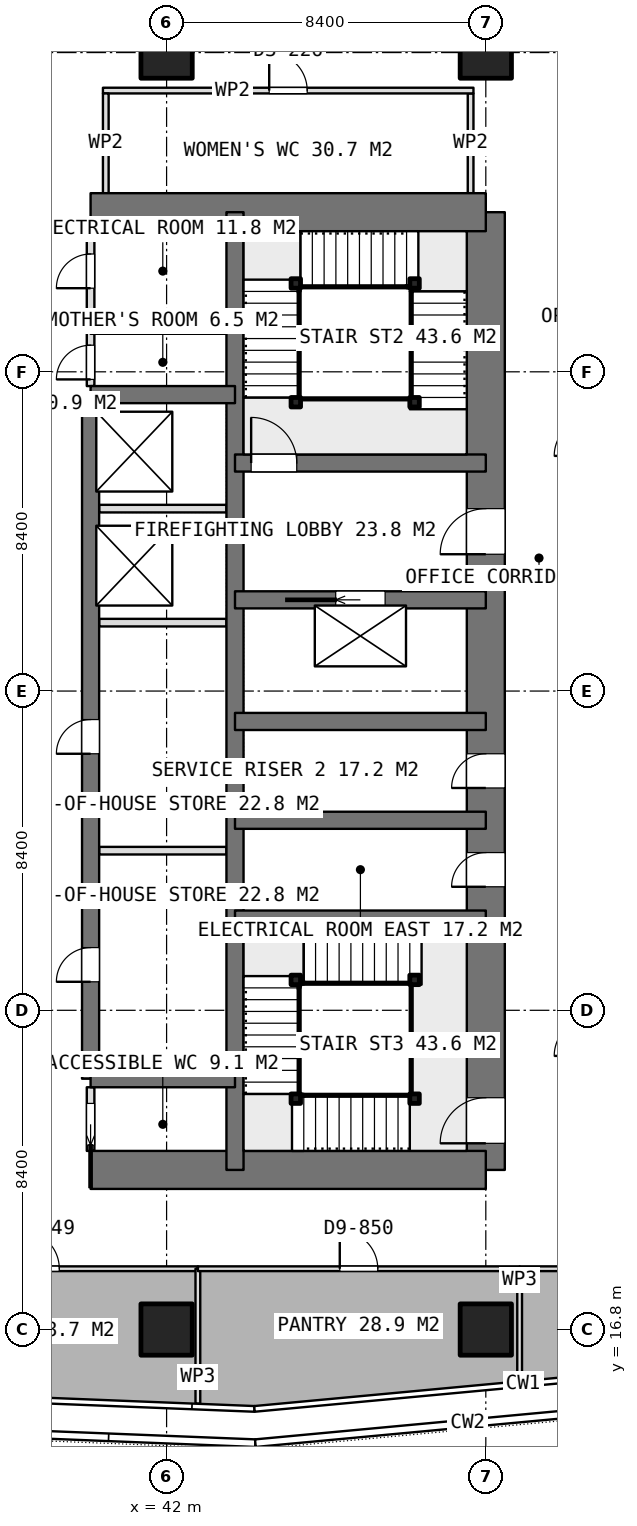
"""IFC4 building model, lengths in metres.
Left out: names, types, materials, properties, quantities, classifications, styles, units other than length and angle.
Written with IfcOpenShell. Run it as: python <this file> out.ifc"""

import sys

from ifc_helpers import new_model, si_unit, direction, frame, frame_2d, origin, origin_2d, place, context, subcontext, project, spatial, rectangle, extrude, element, fill, save


model = new_model("IFC4")
c1 = context("Model", 3, precision=1e-05, world=origin(), true_north=direction((0.0, 1.0)))
c2 = subcontext(c1, "Body", "Model", "MODEL_VIEW")
j1 = project(units=[si_unit("LENGTHUNIT", "METRE"), si_unit("PLANEANGLEUNIT", "RADIAN")], contexts=[c1])
p1 = place(None, origin())
s1 = spatial("IfcSite", under=j1, at=p1, CompositionType="ELEMENT")
p2 = place(p1, origin())
s2 = spatial("IfcBuilding", under=s1, at=p2, CompositionType="ELEMENT")
p3 = place(p2, frame((0.0, 0.0, 210.2)))
s3 = spatial("IfcBuildingStorey", under=s2, at=p3, CompositionType="ELEMENT", Elevation=210.2)
for number, where, z_axis, x_axis in (
    (1, (40.0, 21.0, 0.0), (0.0, 0.0, 1.0), (1.0, 0.0, 0.0)),
    (2, (40.0, 46.2, 0.0), (0.0, 0.0, 1.0), (1.0, 0.0, 0.0)),
):
    element("IfcWall", number, at=place(p3, frame(where, z_axis=z_axis, x_axis=x_axis)), inside=s3, PredefinedType="SHEAR", context=c2, shape_type="SweptSolid", body=[
        extrude(rectangle(XDim=10.4, YDim=1.0, at=frame_2d((5.2, 0.0))), origin(), (0.0, 0.0, 1.0), 3.75),
    ])
p4 = place(p3, frame((50.4, 21.0, 0.0), z_axis=(0.0, 0.0, 1.0), x_axis=(0.0, 1.0, 0.0)))
e3 = element("IfcWall", 3, at=p4, inside=s3, PredefinedType="SHEAR", context=c2, shape_type="SweptSolid", body=[
    extrude(rectangle(XDim=25.2, YDim=1.0, at=frame_2d((12.6, 0.0))), origin(), (0.0, 0.0, 1.0), 3.75),
])
p5 = place(p4, frame((16.2, 0.0, 0.0)))
e4 = element("IfcOpeningElement", 4, at=p5, cuts=e3, PredefinedType="OPENING", context=c2, shape_type="SweptSolid", body=[
    extrude(rectangle(XDim=1.2, YDim=2.1, at=frame_2d((0.6, 1.05))), frame((0.0, 0.51, 0.0), z_axis=(0.0, -1.0, 0.0), x_axis=(1.0, 0.0, 0.0)), (0.0, 0.0, 1.0), 1.02),
])
p6 = place(p4, frame((10.05, 0.0, 0.0)))
e5 = element("IfcOpeningElement", 5, at=p6, cuts=e3, PredefinedType="OPENING", context=c2, shape_type="SweptSolid", body=[
    extrude(rectangle(XDim=0.9, YDim=2.1, at=frame_2d((0.45, 1.05))), frame((0.0, 0.51, 0.0), z_axis=(0.0, -1.0, 0.0), x_axis=(1.0, 0.0, 0.0)), (0.0, 0.0, 1.0), 1.02),
])
p7 = place(p4, frame((7.45, 0.0, 0.0)))
e6 = element("IfcOpeningElement", 6, at=p7, cuts=e3, PredefinedType="OPENING", context=c2, shape_type="SweptSolid", body=[
    extrude(rectangle(XDim=0.9, YDim=2.1, at=frame_2d((0.45, 1.05))), frame((0.0, 0.51, 0.0), z_axis=(0.0, -1.0, 0.0), x_axis=(1.0, 0.0, 0.0)), (0.0, 0.0, 1.0), 1.02),
])
p8 = place(p4, frame((0.7, 0.0, 0.0)))
e7 = element("IfcOpeningElement", 7, at=p8, cuts=e3, PredefinedType="OPENING", context=c2, shape_type="SweptSolid", body=[
    extrude(rectangle(XDim=1.2, YDim=2.1, at=frame_2d((0.6, 1.05))), frame((0.0, 0.51, 0.0), z_axis=(0.0, -1.0, 0.0), x_axis=(1.0, 0.0, 0.0)), (0.0, 0.0, 1.0), 1.02),
])
p9 = place(p3, frame((43.8, 21.0, 0.0), z_axis=(0.0, 0.0, 1.0), x_axis=(0.0, 1.0, 0.0)))
e8 = element("IfcWall", 8, at=p9, inside=s3, PredefinedType="SHEAR", context=c2, shape_type="SweptSolid", body=[
    extrude(rectangle(XDim=25.2, YDim=0.45, at=frame_2d((12.6, 0.0))), origin(), (0.0, 0.0, 1.0), 3.75),
])
p10 = place(p3, frame((40.0, 23.4, 0.0), z_axis=(0.0, 0.0, 1.0), x_axis=(0.0, 1.0, 0.0)))
e9 = element("IfcWall", 9, at=p10, inside=s3, PredefinedType="SHEAR", context=c2, shape_type="SweptSolid", body=[
    extrude(rectangle(XDim=18.0, YDim=0.45, at=frame_2d((9.0, 0.0))), origin(), (0.0, 0.0, 1.0), 3.75),
])
p11 = place(p10, frame((2.55, 0.0, 0.0)))
e10 = element("IfcOpeningElement", 10, at=p11, cuts=e9, PredefinedType="OPENING", context=c2, shape_type="SweptSolid", body=[
    extrude(rectangle(XDim=0.9, YDim=2.1, at=frame_2d((0.45, 1.05))), frame((0.0, 0.235, 0.0), z_axis=(0.0, -1.0, 0.0), x_axis=(1.0, 0.0, 0.0)), (0.0, 0.0, 1.0), 0.47),
])
p12 = place(p10, frame((8.55, 0.0, 0.0)))
e11 = element("IfcOpeningElement", 11, at=p12, cuts=e9, PredefinedType="OPENING", context=c2, shape_type="SweptSolid", body=[
    extrude(rectangle(XDim=0.9, YDim=2.1, at=frame_2d((0.45, 1.05))), frame((0.0, 0.235, 0.0), z_axis=(0.0, -1.0, 0.0), x_axis=(1.0, 0.0, 0.0)), (0.0, 0.0, 1.0), 0.47),
])
for number, where, z_axis, x_axis in (
    (12, (40.0, 23.4, 0.0), (0.0, 0.0, 1.0), (1.0, 0.0, 0.0)),
    (13, (40.0, 41.4, 0.0), (0.0, 0.0, 1.0), (1.0, 0.0, 0.0)),
):
    element("IfcWall", number, at=place(p3, frame(where, z_axis=z_axis, x_axis=x_axis)), inside=s3, PredefinedType="SHEAR", context=c2, shape_type="SweptSolid", body=[
        extrude(rectangle(XDim=3.8, YDim=0.45, at=frame_2d((1.9, 0.0))), origin(), (0.0, 0.0, 1.0), 3.75),
    ])
for number, where, z_axis, x_axis in (
    (14, (43.8, 27.6, 0.0), (0.0, 0.0, 1.0), (1.0, 0.0, 0.0)),
    (15, (43.8, 30.2, 0.0), (0.0, 0.0, 1.0), (1.0, 0.0, 0.0)),
    (16, (43.8, 32.8, 0.0), (0.0, 0.0, 1.0), (1.0, 0.0, 0.0)),
):
    element("IfcWall", number, at=place(p3, frame(where, z_axis=z_axis, x_axis=x_axis)), inside=s3, PredefinedType="SHEAR", context=c2, shape_type="SweptSolid", body=[
        extrude(rectangle(XDim=6.6, YDim=0.45, at=frame_2d((3.3, 0.0))), origin(), (0.0, 0.0, 1.0), 3.75),
    ])
p13 = place(p3, frame((43.8, 36.0, 0.0), z_axis=(0.0, 0.0, 1.0), x_axis=(1.0, 0.0, 0.0)))
e17 = element("IfcWall", 17, at=p13, inside=s3, PredefinedType="SHEAR", context=c2, shape_type="SweptSolid", body=[
    extrude(rectangle(XDim=6.6, YDim=0.45, at=frame_2d((3.3, 0.0))), origin(), (0.0, 0.0, 1.0), 3.75),
])
p14 = place(p13, frame((2.65, 0.0, 0.0)))
e18 = element("IfcOpeningElement", 18, at=p14, cuts=e17, PredefinedType="OPENING", context=c2, shape_type="SweptSolid", body=[
    extrude(rectangle(XDim=1.3, YDim=2.1, at=frame_2d((0.65, 1.05))), frame((0.0, 0.235, 0.0), z_axis=(0.0, -1.0, 0.0), x_axis=(1.0, 0.0, 0.0)), (0.0, 0.0, 1.0), 0.47),
])
p15 = place(p3, frame((43.8, 39.6, 0.0), z_axis=(0.0, 0.0, 1.0), x_axis=(1.0, 0.0, 0.0)))
e19 = element("IfcWall", 19, at=p15, inside=s3, PredefinedType="SHEAR", context=c2, shape_type="SweptSolid", body=[
    extrude(rectangle(XDim=6.6, YDim=0.45, at=frame_2d((3.3, 0.0))), origin(), (0.0, 0.0, 1.0), 3.75),
])
p16 = place(p15, frame((0.425, 0.0, 0.0)))
e20 = element("IfcOpeningElement", 20, at=p16, cuts=e19, PredefinedType="OPENING", context=c2, shape_type="SweptSolid", body=[
    extrude(rectangle(XDim=1.2, YDim=2.1, at=frame_2d((0.6, 1.05))), frame((0.0, 0.235, 0.0), z_axis=(0.0, -1.0, 0.0), x_axis=(1.0, 0.0, 0.0)), (0.0, 0.0, 1.0), 0.47),
])
for number, where, z_axis, x_axis in (
    (21, (42.0, 16.8, 0.0), (0.0, 0.0, 1.0), (1.0, 0.0, 0.0)),
    (22, (42.0, 50.4, 0.0), (0.0, 0.0, 1.0), (1.0, 0.0, 0.0)),
    (23, (50.4, 16.8, 0.0), (0.0, 0.0, 1.0), (1.0, 0.0, 0.0)),
    (24, (50.4, 50.4, 0.0), (0.0, 0.0, 1.0), (1.0, 0.0, 0.0)),
):
    element("IfcColumn", number, at=place(p3, frame(where, z_axis=z_axis, x_axis=x_axis)), inside=s3, PredefinedType="COLUMN", context=c2, shape_type="SweptSolid", body=[
        extrude(rectangle(XDim=1.35, YDim=1.35, at=origin_2d()), origin(), (0.0, 0.0, 1.0), 3.75),
    ])
for number, where, z_axis, x_axis in (
    (25, (40.225, 29.4, 0.0), (0.0, 0.0, 1.0), (1.0, 0.0, 0.0)),
    (26, (40.225, 35.4, 0.0), (0.0, 0.0, 1.0), (1.0, 0.0, 0.0)),
    (27, (40.225, 38.4, 0.0), (0.0, 0.0, 1.0), (1.0, 0.0, 0.0)),
):
    element("IfcWall", number, at=place(p3, frame(where, z_axis=z_axis, x_axis=x_axis)), inside=s3, PredefinedType="PARTITIONING", context=c2, shape_type="SweptSolid", body=[
        extrude(rectangle(XDim=3.35, YDim=0.2, at=frame_2d((1.675, 0.0))), origin(), (0.0, 0.0, 1.0), 3.5),
    ])
p17 = place(p3, frame((40.0, 21.5, 0.0), z_axis=(0.0, 0.0, 1.0), x_axis=(0.0, 1.0, 0.0)))
e28 = element("IfcWall", 28, at=p17, inside=s3, PredefinedType="PARTITIONING", context=c2, shape_type="SweptSolid", body=[
    extrude(rectangle(XDim=1.675, YDim=0.2, at=frame_2d((0.837, 0.0))), origin(), (0.0, 0.0, 1.0), 3.5),
])
p18 = place(p17, frame((0.15, 0.0, 0.0)))
e29 = element("IfcOpeningElement", 29, at=p18, cuts=e28, PredefinedType="OPENING", context=c2, shape_type="SweptSolid", body=[
    extrude(rectangle(XDim=1.1, YDim=2.1, at=frame_2d((0.55, 1.05))), frame((0.0, 0.11, 0.0), z_axis=(0.0, -1.0, 0.0), x_axis=(1.0, 0.0, 0.0)), (0.0, 0.0, 1.0), 0.22),
])
p19 = place(p3, frame((40.0, 41.625, 0.0), z_axis=(0.0, 0.0, 1.0), x_axis=(0.0, 1.0, 0.0)))
e30 = element("IfcWall", 30, at=p19, inside=s3, PredefinedType="PARTITIONING", context=c2, shape_type="SweptSolid", body=[
    extrude(rectangle(XDim=4.075, YDim=0.2, at=frame_2d((2.038, 0.0))), origin(), (0.0, 0.0, 1.0), 3.5),
])
p20 = place(p19, frame((2.575, 0.0, 0.0)))
e31 = element("IfcOpeningElement", 31, at=p20, cuts=e30, PredefinedType="OPENING", context=c2, shape_type="SweptSolid", body=[
    extrude(rectangle(XDim=0.9, YDim=2.1, at=frame_2d((0.45, 1.05))), frame((0.0, 0.11, 0.0), z_axis=(0.0, -1.0, 0.0), x_axis=(1.0, 0.0, 0.0)), (0.0, 0.0, 1.0), 0.22),
])
p21 = place(p19, frame((0.175, 0.0, 0.0)))
e32 = element("IfcOpeningElement", 32, at=p21, cuts=e30, PredefinedType="OPENING", context=c2, shape_type="SweptSolid", body=[
    extrude(rectangle(XDim=0.9, YDim=2.1, at=frame_2d((0.45, 1.05))), frame((0.0, 0.11, 0.0), z_axis=(0.0, -1.0, 0.0), x_axis=(1.0, 0.0, 0.0)), (0.0, 0.0, 1.0), 0.22),
])
p22 = place(p3, frame((40.0, 43.1, 0.0), z_axis=(0.0, 0.0, 1.0), x_axis=(1.0, 0.0, 0.0)))
e33 = element("IfcWall", 33, at=p22, inside=s3, PredefinedType="PARTITIONING", context=c2, shape_type="SweptSolid", body=[
    extrude(rectangle(XDim=3.575, YDim=0.2, at=frame_2d((1.788, 0.0))), origin(), (0.0, 0.0, 1.0), 3.5),
])
p23 = place(p3, frame((40.325, 49.4, 0.0), z_axis=(0.0, 0.0, 1.0), x_axis=(1.0, 0.0, 0.0)))
e34 = element("IfcWall", 34, at=p23, inside=s3, PredefinedType="PARTITIONING", context=c2, shape_type="SweptSolid", body=[
    extrude(rectangle(XDim=9.75, YDim=0.15, at=frame_2d((4.875, 0.0))), origin(), (0.0, 0.0, 1.0), 3.5),
])
p24 = place(p23, frame((4.375, 0.0, 0.0)))
e35 = element("IfcOpeningElement", 35, at=p24, cuts=e34, PredefinedType="OPENING", context=c2, shape_type="SweptSolid", body=[
    extrude(rectangle(XDim=1.0, YDim=2.1, at=frame_2d((0.5, 1.05))), frame((0.0, 0.085, 0.0), z_axis=(0.0, -1.0, 0.0), x_axis=(1.0, 0.0, 0.0)), (0.0, 0.0, 1.0), 0.17),
])
for number, where, z_axis, x_axis in (
    (36, (40.4, 46.7, 0.0), (0.0, 0.0, 1.0), (0.0, 1.0, 0.0)),
    (37, (50.0, 46.7, 0.0), (0.0, 0.0, 1.0), (0.0, 1.0, 0.0)),
):
    element("IfcWall", number, at=place(p3, frame(where, z_axis=z_axis, x_axis=x_axis)), inside=s3, PredefinedType="PARTITIONING", context=c2, shape_type="SweptSolid", body=[
        extrude(rectangle(XDim=2.625, YDim=0.15, at=frame_2d((1.312, 0.0))), origin(), (0.0, 0.0, 1.0), 3.5),
    ])
p25 = place(p3, frame((34.531, 18.4, 0.0), z_axis=(0.0, 0.0, 1.0), x_axis=(1.0, 0.0, 0.0)))
e38 = element("IfcWall", 38, at=p25, inside=s3, PredefinedType="PARTITIONING", context=c2, shape_type="SweptSolid", body=[
    extrude(rectangle(XDim=8.292, YDim=0.125, at=frame_2d((4.146, 0.0))), origin(), (0.0, 0.0, 1.0), 3.5),
])
p26 = place(p25, frame((3.646, 0.0, 0.0)))
e39 = element("IfcOpeningElement", 39, at=p26, cuts=e38, PredefinedType="OPENING", context=c2, shape_type="SweptSolid", body=[
    extrude(rectangle(XDim=1.0, YDim=2.1, at=frame_2d((0.5, 1.05))), frame((0.0, 0.073, 0.0), z_axis=(0.0, -1.0, 0.0), x_axis=(1.0, 0.0, 0.0)), (0.0, 0.0, 1.0), 0.145),
])
p27 = place(p3, frame((42.823, 18.4, 0.0), z_axis=(0.0, 0.0, 1.0), x_axis=(0.0, -1.0, 0.0)))
e40 = element("IfcWall", 40, at=p27, inside=s3, PredefinedType="PARTITIONING", context=c2, shape_type="SweptSolid", body=[
    extrude(rectangle(XDim=3.549, YDim=0.125, at=frame_2d((1.774, 0.0))), origin(), (0.0, 0.0, 1.0), 3.5),
])
p28 = place(p3, frame((42.824, 18.4, 0.0), z_axis=(0.0, 0.0, 1.0), x_axis=(1.0, 0.0, 0.0)))
e41 = element("IfcWall", 41, at=p28, inside=s3, PredefinedType="PARTITIONING", context=c2, shape_type="SweptSolid", body=[
    extrude(rectangle(XDim=8.466, YDim=0.125, at=frame_2d((4.233, 0.0))), origin(), (0.0, 0.0, 1.0), 3.5),
])
p29 = place(p28, frame((3.733, 0.0, 0.0)))
e42 = element("IfcOpeningElement", 42, at=p29, cuts=e41, PredefinedType="OPENING", context=c2, shape_type="SweptSolid", body=[
    extrude(rectangle(XDim=1.0, YDim=2.1, at=frame_2d((0.5, 1.05))), frame((0.0, 0.073, 0.0), z_axis=(0.0, -1.0, 0.0), x_axis=(1.0, 0.0, 0.0)), (0.0, 0.0, 1.0), 0.145),
])
p30 = place(p3, frame((51.29, 18.4, 0.0), z_axis=(0.0, 0.0, 1.0), x_axis=(0.0, -1.0, 0.0)))
e43 = element("IfcWall", 43, at=p30, inside=s3, PredefinedType="PARTITIONING", context=c2, shape_type="SweptSolid", body=[
    extrude(rectangle(XDim=2.958, YDim=0.125, at=frame_2d((1.479, 0.0))), origin(), (0.0, 0.0, 1.0), 3.5),
])
p31 = place(p3, frame((51.291, 18.4, 0.0), z_axis=(0.0, 0.0, 1.0), x_axis=(1.0, 0.0, 0.0)))
e44 = element("IfcWall", 44, at=p31, inside=s3, PredefinedType="PARTITIONING", context=c2, shape_type="SweptSolid", body=[
    extrude(rectangle(XDim=5.109, YDim=0.125, at=frame_2d((2.554, 0.0))), origin(), (0.0, 0.0, 1.0), 3.5),
])
p32 = place(p31, frame((1.655, 0.0, 0.0)))
e45 = element("IfcOpeningElement", 45, at=p32, cuts=e44, PredefinedType="OPENING", context=c2, shape_type="SweptSolid", body=[
    extrude(rectangle(XDim=1.8, YDim=2.1, at=frame_2d((0.9, 1.05))), frame((0.0, 0.073, 0.0), z_axis=(0.0, -1.0, 0.0), x_axis=(1.0, 0.0, 0.0)), (0.0, 0.0, 1.0), 0.145),
])
for number, where, z_axis, x_axis in (
    (46, (45.4, 41.2, 0.0), (0.0, 0.0, 1.0), (1.0, 0.0, 0.0)),
    (47, (45.4, 44.325, 0.0), (0.0, 0.0, 1.0), (1.0, 0.0, 0.0)),
    (48, (48.525, 44.325, 0.0), (0.0, 0.0, 1.0), (1.0, 0.0, 0.0)),
    (49, (48.525, 41.2, 0.0), (0.0, 0.0, 1.0), (1.0, 0.0, 0.0)),
    (50, (48.525, 22.875, 0.0), (0.0, 0.0, 1.0), (1.0, 0.0, 0.0)),
    (51, (45.4, 22.875, 0.0), (0.0, 0.0, 1.0), (1.0, 0.0, 0.0)),
    (52, (45.4, 26.0, 0.0), (0.0, 0.0, 1.0), (1.0, 0.0, 0.0)),
    (53, (48.525, 26.0, 0.0), (0.0, 0.0, 1.0), (1.0, 0.0, 0.0)),
):
    element("IfcColumn", number, at=place(p3, frame(where, z_axis=z_axis, x_axis=x_axis)), inside=s3, PredefinedType="COLUMN", context=c2, shape_type="SweptSolid", body=[
        extrude(rectangle(XDim=0.25, YDim=0.25, at=origin_2d()), origin(), (0.0, 0.0, 1.0), 3.75),
    ])
p33 = place(p5, origin())
e54 = element("IfcDoor", 54, at=p33, inside=s3, OperationType="SINGLE_SWING_LEFT", PredefinedType="DOOR", context=c2, shape_type="SweptSolid", body=[
    extrude(rectangle(XDim=1.2, YDim=2.1, at=frame_2d((0.6, 1.05))), frame((0.0, 0.025, 0.0), z_axis=(0.0, -1.0, 0.0), x_axis=(1.0, 0.0, 0.0)), (0.0, 0.0, 1.0), 0.05),
])
fill(e4, e54)
p34 = place(p6, origin())
e55 = element("IfcDoor", 55, at=p34, inside=s3, OperationType="SINGLE_SWING_LEFT", PredefinedType="DOOR", context=c2, shape_type="SweptSolid", body=[
    extrude(rectangle(XDim=0.9, YDim=2.1, at=frame_2d((0.45, 1.05))), frame((0.0, 0.025, 0.0), z_axis=(0.0, -1.0, 0.0), x_axis=(1.0, 0.0, 0.0)), (0.0, 0.0, 1.0), 0.05),
])
fill(e5, e55)
p35 = place(p7, origin())
e56 = element("IfcDoor", 56, at=p35, inside=s3, OperationType="SINGLE_SWING_LEFT", PredefinedType="DOOR", context=c2, shape_type="SweptSolid", body=[
    extrude(rectangle(XDim=0.9, YDim=2.1, at=frame_2d((0.45, 1.05))), frame((0.0, 0.025, 0.0), z_axis=(0.0, -1.0, 0.0), x_axis=(1.0, 0.0, 0.0)), (0.0, 0.0, 1.0), 0.05),
])
fill(e6, e56)
p36 = place(p18, origin())
e57 = element("IfcDoor", 57, at=p36, inside=s3, OperationType="SLIDING_TO_LEFT", PredefinedType="DOOR", context=c2, shape_type="SweptSolid", body=[
    extrude(rectangle(XDim=1.1, YDim=2.1, at=frame_2d((0.55, 1.05))), frame((0.0, 0.025, 0.0), z_axis=(0.0, -1.0, 0.0), x_axis=(1.0, 0.0, 0.0)), (0.0, 0.0, 1.0), 0.05),
])
fill(e29, e57)
p37 = place(p20, origin())
e58 = element("IfcDoor", 58, at=p37, inside=s3, OperationType="SINGLE_SWING_LEFT", PredefinedType="DOOR", context=c2, shape_type="SweptSolid", body=[
    extrude(rectangle(XDim=0.9, YDim=2.1, at=frame_2d((0.45, 1.05))), frame((0.0, 0.025, 0.0), z_axis=(0.0, -1.0, 0.0), x_axis=(1.0, 0.0, 0.0)), (0.0, 0.0, 1.0), 0.05),
])
fill(e31, e58)
p38 = place(p21, origin())
e59 = element("IfcDoor", 59, at=p38, inside=s3, OperationType="SINGLE_SWING_LEFT", PredefinedType="DOOR", context=c2, shape_type="SweptSolid", body=[
    extrude(rectangle(XDim=0.9, YDim=2.1, at=frame_2d((0.45, 1.05))), frame((0.0, 0.025, 0.0), z_axis=(0.0, -1.0, 0.0), x_axis=(1.0, 0.0, 0.0)), (0.0, 0.0, 1.0), 0.05),
])
fill(e32, e59)
p39 = place(p11, origin())
e60 = element("IfcDoor", 60, at=p39, inside=s3, OperationType="SINGLE_SWING_LEFT", PredefinedType="DOOR", context=c2, shape_type="SweptSolid", body=[
    extrude(rectangle(XDim=0.9, YDim=2.1, at=frame_2d((0.45, 1.05))), frame((0.0, 0.025, 0.0), z_axis=(0.0, -1.0, 0.0), x_axis=(1.0, 0.0, 0.0)), (0.0, 0.0, 1.0), 0.05),
])
fill(e10, e60)
p40 = place(p12, origin())
e61 = element("IfcDoor", 61, at=p40, inside=s3, OperationType="SINGLE_SWING_LEFT", PredefinedType="DOOR", context=c2, shape_type="SweptSolid", body=[
    extrude(rectangle(XDim=0.9, YDim=2.1, at=frame_2d((0.45, 1.05))), frame((0.0, 0.025, 0.0), z_axis=(0.0, -1.0, 0.0), x_axis=(1.0, 0.0, 0.0)), (0.0, 0.0, 1.0), 0.05),
])
fill(e11, e61)
p41 = place(p14, origin())
e62 = element("IfcDoor", 62, at=p41, inside=s3, OperationType="SLIDING_TO_LEFT", PredefinedType="USERDEFINED", context=c2, shape_type="SweptSolid", body=[
    extrude(rectangle(XDim=1.3, YDim=2.1, at=frame_2d((0.65, 1.05))), frame((0.0, 0.025, 0.0), z_axis=(0.0, -1.0, 0.0), x_axis=(1.0, 0.0, 0.0)), (0.0, 0.0, 1.0), 0.05),
])
fill(e18, e62)
p42 = place(p24, origin())
e63 = element("IfcDoor", 63, at=p42, inside=s3, OperationType="SINGLE_SWING_LEFT", PredefinedType="DOOR", context=c2, shape_type="SweptSolid", body=[
    extrude(rectangle(XDim=1.0, YDim=2.1, at=frame_2d((0.5, 1.05))), frame((0.0, 0.025, 0.0), z_axis=(0.0, -1.0, 0.0), x_axis=(1.0, 0.0, 0.0)), (0.0, 0.0, 1.0), 0.05),
])
fill(e35, e63)
p43 = place(p26, origin())
e64 = element("IfcDoor", 64, at=p43, inside=s3, OperationType="SINGLE_SWING_LEFT", PredefinedType="DOOR", context=c2, shape_type="SweptSolid", body=[
    extrude(rectangle(XDim=1.0, YDim=2.1, at=frame_2d((0.5, 1.05))), frame((0.0, 0.025, 0.0), z_axis=(0.0, -1.0, 0.0), x_axis=(1.0, 0.0, 0.0)), (0.0, 0.0, 1.0), 0.05),
])
fill(e39, e64)
p44 = place(p29, origin())
e65 = element("IfcDoor", 65, at=p44, inside=s3, OperationType="SINGLE_SWING_LEFT", PredefinedType="DOOR", context=c2, shape_type="SweptSolid", body=[
    extrude(rectangle(XDim=1.0, YDim=2.1, at=frame_2d((0.5, 1.05))), frame((0.0, 0.025, 0.0), z_axis=(0.0, -1.0, 0.0), x_axis=(1.0, 0.0, 0.0)), (0.0, 0.0, 1.0), 0.05),
])
fill(e42, e65)
p45 = place(p16, origin())
e66 = element("IfcDoor", 66, at=p45, inside=s3, OperationType="SINGLE_SWING_RIGHT", PredefinedType="DOOR", context=c2, shape_type="SweptSolid", body=[
    extrude(rectangle(XDim=1.2, YDim=2.1, at=frame_2d((0.6, 1.05))), frame((0.0, 0.025, 0.0), z_axis=(0.0, -1.0, 0.0), x_axis=(1.0, 0.0, 0.0)), (0.0, 0.0, 1.0), 0.05),
])
fill(e20, e66)
p46 = place(p8, origin())
e67 = element("IfcDoor", 67, at=p46, inside=s3, OperationType="SINGLE_SWING_RIGHT", PredefinedType="DOOR", context=c2, shape_type="SweptSolid", body=[
    extrude(rectangle(XDim=1.2, YDim=2.1, at=frame_2d((0.6, 1.05))), frame((0.0, 0.025, 0.0), z_axis=(0.0, -1.0, 0.0), x_axis=(1.0, 0.0, 0.0)), (0.0, 0.0, 1.0), 0.05),
])
fill(e7, e67)
save(model, sys.argv[1])
